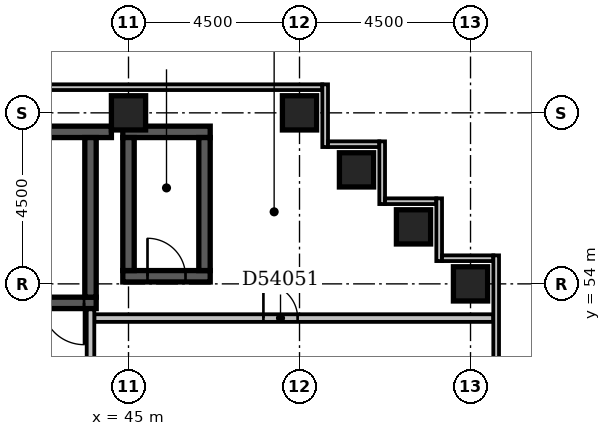
"""IFC4 building model, lengths in metres.
Left out: names, types, materials, properties, quantities, classifications, styles, units other than length and angle.
Written with IfcOpenShell. Run it as: python <this file> out.ifc"""

import sys

from ifc_helpers import new_model, si_unit, direction, frame, frame_2d, origin, origin_2d, place, context, subcontext, project, spatial, rectangle, extrude, element, fill, save


model = new_model("IFC4")
c1 = context("Model", 3, precision=1e-05, world=origin(), true_north=direction((0.0, 1.0)))
c2 = subcontext(c1, "Body", "Model", "MODEL_VIEW")
j1 = project(units=[si_unit("LENGTHUNIT", "METRE"), si_unit("PLANEANGLEUNIT", "RADIAN")], contexts=[c1])
p1 = place(None, origin())
s1 = spatial("IfcSite", under=j1, at=p1, CompositionType="ELEMENT")
p2 = place(p1, origin())
s2 = spatial("IfcBuilding", under=s1, at=p2, CompositionType="ELEMENT")
p3 = place(p2, frame((0.0, 0.0, 211.4)))
s3 = spatial("IfcBuildingStorey", under=s2, at=p3, CompositionType="ELEMENT", Elevation=211.4)
p4 = place(p3, frame((37.15, 53.5, -0.35), z_axis=(0.0, 0.0, 1.0), x_axis=(1.0, 0.0, 0.0)))
e1 = element("IfcWall", 1, at=p4, inside=s3, PredefinedType="SHEAR", context=c2, shape_type="SweptSolid", body=[
    extrude(rectangle(XDim=7.0, YDim=0.3, at=frame_2d((3.5, 0.0))), origin(), (0.0, 0.0, 1.0), 3.65),
])
p5 = place(p4, frame((5.58, 0.0, 0.35)))
e2 = element("IfcOpeningElement", 2, at=p5, cuts=e1, PredefinedType="OPENING", context=c2, shape_type="SweptSolid", body=[
    extrude(rectangle(XDim=1.1, YDim=2.1, at=frame_2d((0.55, 1.05))), frame((0.0, 0.162, 0.0), z_axis=(0.0, -1.0, 0.0), x_axis=(1.0, 0.0, 0.0)), (0.0, 0.0, 1.0), 0.324),
])
p6 = place(p3, frame((37.15, 58.0, -0.35), z_axis=(0.0, 0.0, 1.0), x_axis=(1.0, 0.0, 0.0)))
e3 = element("IfcWall", 3, at=p6, inside=s3, PredefinedType="SHEAR", context=c2, shape_type="SweptSolid", body=[
    extrude(rectangle(XDim=7.4, YDim=0.3, at=frame_2d((3.7, 0.0))), origin(), (0.0, 0.0, 1.0), 3.65),
])
p7 = place(p3, frame((44.0, 53.65, -0.35), z_axis=(0.0, 0.0, 1.0), x_axis=(0.0, 1.0, 0.0)))
e4 = element("IfcWall", 4, at=p7, inside=s3, PredefinedType="SHEAR", context=c2, shape_type="SweptSolid", body=[
    extrude(rectangle(XDim=4.2, YDim=0.3, at=frame_2d((2.1, 0.0))), origin(), (0.0, 0.0, 1.0), 3.65),
])
p8 = place(p3, frame((44.85, 54.2, -0.35), z_axis=(0.0, 0.0, 1.0), x_axis=(1.0, 0.0, 0.0)))
e5 = element("IfcWall", 5, at=p8, inside=s3, PredefinedType="SHEAR", context=c2, shape_type="SweptSolid", body=[
    extrude(rectangle(XDim=2.3, YDim=0.3, at=frame_2d((1.15, 0.0))), origin(), (0.0, 0.0, 1.0), 3.65),
])
p9 = place(p8, frame((0.65, 0.0, 0.35)))
e6 = element("IfcOpeningElement", 6, at=p9, cuts=e5, PredefinedType="OPENING", context=c2, shape_type="SweptSolid", body=[
    extrude(rectangle(XDim=1.0, YDim=2.1, at=frame_2d((0.5, 1.05))), frame((0.0, 0.162, 0.0), z_axis=(0.0, -1.0, 0.0), x_axis=(1.0, 0.0, 0.0)), (0.0, 0.0, 1.0), 0.324),
])
p10 = place(p3, frame((44.85, 58.0, -0.35), z_axis=(0.0, 0.0, 1.0), x_axis=(1.0, 0.0, 0.0)))
e7 = element("IfcWall", 7, at=p10, inside=s3, PredefinedType="SHEAR", context=c2, shape_type="SweptSolid", body=[
    extrude(rectangle(XDim=2.3, YDim=0.3, at=frame_2d((1.15, 0.0))), origin(), (0.0, 0.0, 1.0), 3.65),
])
for number, where, z_axis, x_axis in (
    (8, (45.0, 54.35, -0.35), (0.0, 0.0, 1.0), (0.0, 1.0, 0.0)),
    (9, (47.0, 54.35, -0.35), (0.0, 0.0, 1.0), (0.0, 1.0, 0.0)),
):
    element("IfcWall", number, at=place(p3, frame(where, z_axis=z_axis, x_axis=x_axis)), inside=s3, PredefinedType="SHEAR", context=c2, shape_type="SweptSolid", body=[
        extrude(rectangle(XDim=3.5, YDim=0.3, at=frame_2d((1.75, 0.0))), origin(), (0.0, 0.0, 1.0), 3.65),
    ])
for number, where, z_axis, x_axis in (
    (10, (54.0, 54.0, -0.35), (0.0, 0.0, 1.0), (1.0, 0.0, 0.0)),
    (11, (52.5, 55.5, -0.35), (0.0, 0.0, 1.0), (1.0, 0.0, 0.0)),
    (12, (51.0, 57.0, -0.35), (0.0, 0.0, 1.0), (1.0, 0.0, 0.0)),
    (13, (45.0, 58.5, -0.35), (0.0, 0.0, 1.0), (1.0, 0.0, 0.0)),
    (14, (49.5, 58.5, -0.35), (0.0, 0.0, 1.0), (1.0, 0.0, 0.0)),
):
    element("IfcColumn", number, at=place(p3, frame(where, z_axis=z_axis, x_axis=x_axis)), inside=s3, PredefinedType="COLUMN", context=c2, shape_type="SweptSolid", body=[
        extrude(rectangle(XDim=0.9, YDim=0.9, at=origin_2d()), origin(), (0.0, 0.0, 1.0), 3.65),
    ])
p11 = place(p3, frame((54.675, 39.9, 0.0), z_axis=(0.0, 0.0, 1.0), x_axis=(0.0, 1.0, 0.0)))
e15 = element("IfcWall", 15, at=p11, inside=s3, PredefinedType="STANDARD", context=c2, shape_type="SweptSolid", body=[
    extrude(rectangle(XDim=14.85, YDim=0.15, at=frame_2d((7.425, 0.0))), origin(), (0.0, 0.0, 1.0), 2.7),
])
p12 = place(p3, frame((54.6, 54.675, 0.0), z_axis=(0.0, 0.0, 1.0), x_axis=(-1.0, 0.0, 0.0)))
e16 = element("IfcWall", 16, at=p12, inside=s3, PredefinedType="STANDARD", context=c2, shape_type="SweptSolid", body=[
    extrude(rectangle(XDim=1.35, YDim=0.15, at=frame_2d((0.675, 0.0))), origin(), (0.0, 0.0, 1.0), 2.7),
])
p13 = place(p3, frame((53.175, 54.6, 0.0), z_axis=(0.0, 0.0, 1.0), x_axis=(0.0, 1.0, 0.0)))
e17 = element("IfcWall", 17, at=p13, inside=s3, PredefinedType="STANDARD", context=c2, shape_type="SweptSolid", body=[
    extrude(rectangle(XDim=1.65, YDim=0.15, at=frame_2d((0.825, 0.0))), origin(), (0.0, 0.0, 1.0), 2.7),
])
p14 = place(p3, frame((53.1, 56.175, 0.0), z_axis=(0.0, 0.0, 1.0), x_axis=(-1.0, 0.0, 0.0)))
e18 = element("IfcWall", 18, at=p14, inside=s3, PredefinedType="STANDARD", context=c2, shape_type="SweptSolid", body=[
    extrude(rectangle(XDim=1.35, YDim=0.15, at=frame_2d((0.675, 0.0))), origin(), (0.0, 0.0, 1.0), 2.7),
])
p15 = place(p3, frame((51.675, 56.1, 0.0), z_axis=(0.0, 0.0, 1.0), x_axis=(0.0, 1.0, 0.0)))
e19 = element("IfcWall", 19, at=p15, inside=s3, PredefinedType="STANDARD", context=c2, shape_type="SweptSolid", body=[
    extrude(rectangle(XDim=1.65, YDim=0.15, at=frame_2d((0.825, 0.0))), origin(), (0.0, 0.0, 1.0), 2.7),
])
p16 = place(p3, frame((51.6, 57.675, 0.0), z_axis=(0.0, 0.0, 1.0), x_axis=(-1.0, 0.0, 0.0)))
e20 = element("IfcWall", 20, at=p16, inside=s3, PredefinedType="STANDARD", context=c2, shape_type="SweptSolid", body=[
    extrude(rectangle(XDim=1.35, YDim=0.15, at=frame_2d((0.675, 0.0))), origin(), (0.0, 0.0, 1.0), 2.7),
])
p17 = place(p3, frame((50.175, 57.6, 0.0), z_axis=(0.0, 0.0, 1.0), x_axis=(0.0, 1.0, 0.0)))
e21 = element("IfcWall", 21, at=p17, inside=s3, PredefinedType="STANDARD", context=c2, shape_type="SweptSolid", body=[
    extrude(rectangle(XDim=1.65, YDim=0.15, at=frame_2d((0.825, 0.0))), origin(), (0.0, 0.0, 1.0), 2.7),
])
p18 = place(p3, frame((50.1, 59.175, 0.0), z_axis=(0.0, 0.0, 1.0), x_axis=(-1.0, 0.0, 0.0)))
e22 = element("IfcWall", 22, at=p18, inside=s3, PredefinedType="STANDARD", context=c2, shape_type="SweptSolid", body=[
    extrude(rectangle(XDim=50.85, YDim=0.15, at=frame_2d((25.425, 0.0))), origin(), (0.0, 0.0, 1.0), 2.7),
])
p19 = place(p18, frame((19.65, 0.0, 0.6)))
e23 = element("IfcOpeningElement", 23, at=p19, cuts=e22, PredefinedType="OPENING", context=c2, shape_type="SweptSolid", body=[
    extrude(rectangle(XDim=2.4, YDim=1.8, at=frame_2d((1.2, 0.9))), frame((0.0, 0.087, 0.0), z_axis=(0.0, -1.0, 0.0), x_axis=(1.0, 0.0, 0.0)), (0.0, 0.0, 1.0), 0.174),
])
p20 = place(p3, frame((44.0, 51.6, 0.0), z_axis=(0.0, 0.0, 1.0), x_axis=(0.0, 1.0, 0.0)))
e24 = element("IfcWall", 24, at=p20, inside=s3, PredefinedType="PARTITIONING", context=c2, shape_type="SweptSolid", body=[
    extrude(rectangle(XDim=1.73, YDim=0.2, at=frame_2d((0.865, 0.0))), origin(), (0.0, 0.0, 1.0), 3.3),
])
p21 = place(p3, frame((44.1, 53.1, 0.0), z_axis=(0.0, 0.0, 1.0), x_axis=(1.0, 0.0, 0.0)))
e25 = element("IfcWall", 25, at=p21, inside=s3, PredefinedType="PARTITIONING", context=c2, shape_type="SweptSolid", body=[
    extrude(rectangle(XDim=10.5, YDim=0.2, at=frame_2d((5.25, 0.0))), origin(), (0.0, 0.0, 1.0), 3.3),
])
p22 = place(p21, frame((4.45, 0.0, 0.0)))
e26 = element("IfcOpeningElement", 26, at=p22, cuts=e25, PredefinedType="OPENING", context=c2, shape_type="SweptSolid", body=[
    extrude(rectangle(XDim=0.9, YDim=2.1, at=frame_2d((0.45, 1.05))), frame((0.0, 0.112, 0.0), z_axis=(0.0, -1.0, 0.0), x_axis=(1.0, 0.0, 0.0)), (0.0, 0.0, 1.0), 0.224),
])
p23 = place(p9, origin())
e27 = element("IfcDoor", 27, at=p23, inside=s3, OperationType="SINGLE_SWING_LEFT", PredefinedType="DOOR", context=c2, shape_type="SweptSolid", body=[
    extrude(rectangle(XDim=1.0, YDim=2.1, at=frame_2d((0.5, 1.05))), frame((0.0, 0.025, 0.0), z_axis=(0.0, -1.0, 0.0), x_axis=(1.0, 0.0, 0.0)), (0.0, 0.0, 1.0), 0.05),
])
fill(e6, e27)
p24 = place(p5, origin())
e28 = element("IfcDoor", 28, at=p24, inside=s3, OperationType="SINGLE_SWING_RIGHT", PredefinedType="DOOR", context=c2, shape_type="SweptSolid", body=[
    extrude(rectangle(XDim=1.1, YDim=2.1, at=frame_2d((0.55, 1.05))), frame((0.0, 0.025, 0.0), z_axis=(0.0, -1.0, 0.0), x_axis=(1.0, 0.0, 0.0)), (0.0, 0.0, 1.0), 0.05),
])
fill(e2, e28)
p25 = place(p22, origin())
e29 = element("IfcDoor", 29, at=p25, inside=s3, OperationType="SINGLE_SWING_LEFT", PredefinedType="DOOR", context=c2, shape_type="SweptSolid", body=[
    extrude(rectangle(XDim=0.9, YDim=2.1, at=frame_2d((0.45, 1.05))), frame((0.0, 0.025, 0.0), z_axis=(0.0, -1.0, 0.0), x_axis=(1.0, 0.0, 0.0)), (0.0, 0.0, 1.0), 0.05),
])
fill(e26, e29)
save(model, sys.argv[1])
